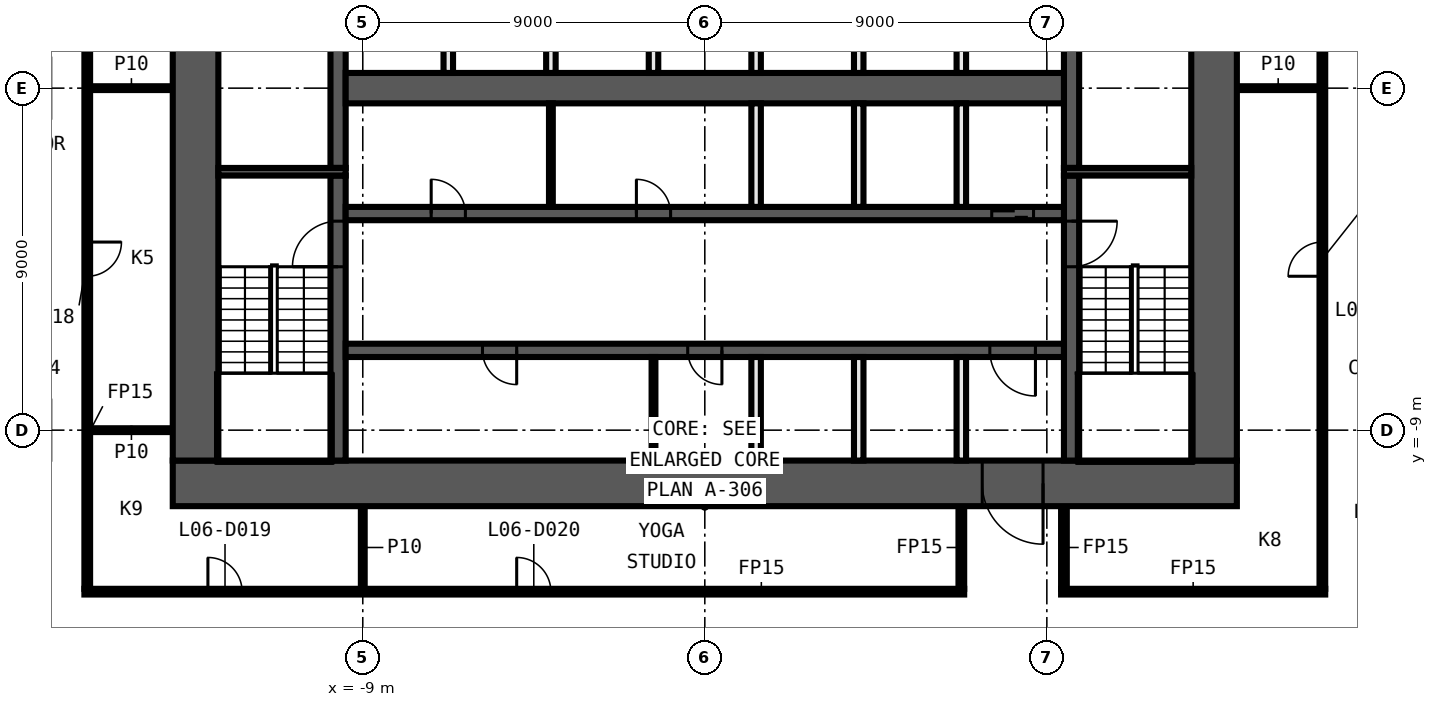
"""IFC4 building model, lengths in metres.
Left out: names, types, materials, properties, quantities, classifications, styles, units other than length and angle.
Written with IfcOpenShell. Run it as: python <this file> out.ifc"""

import sys

from ifc_helpers import new_model, si_unit, direction, frame, frame_2d, origin, place, context, subcontext, project, spatial, rectangle, extrude, element, fill, save


model = new_model("IFC4")
c1 = context("Model", 3, precision=1e-05, world=origin(), true_north=direction((0.0, 1.0)))
c2 = subcontext(c1, "Body", "Model", "MODEL_VIEW")
j1 = project(units=[si_unit("LENGTHUNIT", "METRE"), si_unit("PLANEANGLEUNIT", "RADIAN")], contexts=[c1])
p1 = place(None, origin())
s1 = spatial("IfcSite", under=j1, at=p1, CompositionType="ELEMENT")
p2 = place(p1, origin())
s2 = spatial("IfcBuilding", under=s1, at=p2, CompositionType="ELEMENT")
p3 = place(p2, frame((0.0, 0.0, 44.0)))
s3 = spatial("IfcBuildingStorey", under=s2, at=p3, CompositionType="ELEMENT", Elevation=44.0)
p4 = place(p3, frame((-16.325, -13.25, 0.0), z_axis=(0.0, 0.0, 1.0), x_axis=(1.0, 0.0, 0.0)))
e1 = element("IfcWall", 1, at=p4, inside=s3, PredefinedType="PARTITIONING", context=c2, shape_type="SweptSolid", body=[
    extrude(rectangle(XDim=23.15, YDim=0.15, at=frame_2d((11.575, 0.0))), origin(), (0.0, 0.0, 1.0), 3.3),
])
p5 = place(p4, frame((3.25, 0.0, 0.0)))
e2 = element("IfcOpeningElement", 2, at=p5, cuts=e1, PredefinedType="OPENING", context=c2, shape_type="SweptSolid", body=[
    extrude(rectangle(XDim=0.9, YDim=2.1, at=frame_2d((0.45, 1.05))), frame((0.0, 0.085, 0.0), z_axis=(0.0, -1.0, 0.0), x_axis=(1.0, 0.0, 0.0)), (0.0, 0.0, 1.0), 0.17),
])
p6 = place(p4, frame((11.375, 0.0, 0.0)))
e3 = element("IfcOpeningElement", 3, at=p6, cuts=e1, PredefinedType="OPENING", context=c2, shape_type="SweptSolid", body=[
    extrude(rectangle(XDim=0.9, YDim=2.1, at=frame_2d((0.45, 1.05))), frame((0.0, 0.085, 0.0), z_axis=(0.0, -1.0, 0.0), x_axis=(1.0, 0.0, 0.0)), (0.0, 0.0, 1.0), 0.17),
])
p7 = place(p3, frame((9.375, -13.25, 0.0), z_axis=(0.0, 0.0, 1.0), x_axis=(1.0, 0.0, 0.0)))
e4 = element("IfcWall", 4, at=p7, inside=s3, PredefinedType="PARTITIONING", context=c2, shape_type="SweptSolid", body=[
    extrude(rectangle(XDim=6.95, YDim=0.15, at=frame_2d((3.475, 0.0))), origin(), (0.0, 0.0, 1.0), 3.3),
])
for number, where, z_axis, x_axis in (
    (5, (-16.175, -9.0, 0.0), (0.0, 0.0, 1.0), (1.0, 0.0, 0.0)),
    (6, (-16.175, 0.0, 0.0), (0.0, 0.0, 1.0), (1.0, 0.0, 0.0)),
    (7, (14.0, 0.0, 0.0), (0.0, 0.0, 1.0), (1.0, 0.0, 0.0)),
):
    element("IfcWall", number, at=place(p3, frame(where, z_axis=z_axis, x_axis=x_axis)), inside=s3, PredefinedType="PARTITIONING", context=c2, shape_type="SweptSolid", body=[
        extrude(rectangle(XDim=2.175, YDim=0.1, at=frame_2d((1.087, 0.0))), origin(), (0.0, 0.0, 1.0), 3.3),
    ])
p8 = place(p3, frame((16.25, -13.175, 0.0), z_axis=(0.0, 0.0, 1.0), x_axis=(0.0, 1.0, 0.0)))
e8 = element("IfcWall", 8, at=p8, inside=s3, PredefinedType="PARTITIONING", context=c2, shape_type="SweptSolid", body=[
    extrude(rectangle(XDim=26.35, YDim=0.15, at=frame_2d((13.175, 0.0))), origin(), (0.0, 0.0, 1.0), 3.3),
])
p9 = place(p8, frame((8.225, 0.0, 0.0)))
e9 = element("IfcOpeningElement", 9, at=p9, cuts=e8, PredefinedType="OPENING", context=c2, shape_type="SweptSolid", body=[
    extrude(rectangle(XDim=0.9, YDim=2.1, at=frame_2d((0.45, 1.05))), frame((0.0, 0.085, 0.0), z_axis=(0.0, -1.0, 0.0), x_axis=(1.0, 0.0, 0.0)), (0.0, 0.0, 1.0), 0.17),
])
p10 = place(p8, frame((17.225, 0.0, 0.0)))
e10 = element("IfcOpeningElement", 10, at=p10, cuts=e8, PredefinedType="OPENING", context=c2, shape_type="SweptSolid", body=[
    extrude(rectangle(XDim=0.9, YDim=2.1, at=frame_2d((0.45, 1.05))), frame((0.0, 0.085, 0.0), z_axis=(0.0, -1.0, 0.0), x_axis=(1.0, 0.0, 0.0)), (0.0, 0.0, 1.0), 0.17),
])
for number, where, z_axis, x_axis in (
    (11, (9.45, -13.175, 0.0), (0.0, 0.0, 1.0), (0.0, 1.0, 0.0)),
    (12, (6.75, -13.175, 0.0), (0.0, 0.0, 1.0), (0.0, 1.0, 0.0)),
):
    element("IfcWall", number, at=place(p3, frame(where, z_axis=z_axis, x_axis=x_axis)), inside=s3, PredefinedType="PARTITIONING", context=c2, shape_type="SweptSolid", body=[
        extrude(rectangle(XDim=2.175, YDim=0.15, at=frame_2d((1.087, 0.0))), origin(), (0.0, 0.0, 1.0), 3.3),
    ])
p11 = place(p3, frame((-9.0, -13.175, 0.0), z_axis=(0.0, 0.0, 1.0), x_axis=(0.0, 1.0, 0.0)))
e13 = element("IfcWall", 13, at=p11, inside=s3, PredefinedType="PARTITIONING", context=c2, shape_type="SweptSolid", body=[
    extrude(rectangle(XDim=2.175, YDim=0.1, at=frame_2d((1.087, 0.0))), origin(), (0.0, 0.0, 1.0), 3.3),
])
p12 = place(p3, frame((-16.25, 13.175, 0.0), z_axis=(0.0, 0.0, 1.0), x_axis=(0.0, -1.0, 0.0)))
e14 = element("IfcWall", 14, at=p12, inside=s3, PredefinedType="PARTITIONING", context=c2, shape_type="SweptSolid", body=[
    extrude(rectangle(XDim=26.35, YDim=0.15, at=frame_2d((13.175, 0.0))), origin(), (0.0, 0.0, 1.0), 3.3),
])
p13 = place(p12, frame((17.225, 0.0, 0.0)))
e15 = element("IfcOpeningElement", 15, at=p13, cuts=e14, PredefinedType="OPENING", context=c2, shape_type="SweptSolid", body=[
    extrude(rectangle(XDim=0.9, YDim=2.1, at=frame_2d((0.45, 1.05))), frame((0.0, 0.085, 0.0), z_axis=(0.0, -1.0, 0.0), x_axis=(1.0, 0.0, 0.0)), (0.0, 0.0, 1.0), 0.17),
])
p14 = place(p12, frame((8.225, 0.0, 0.0)))
e16 = element("IfcOpeningElement", 16, at=p14, cuts=e14, PredefinedType="OPENING", context=c2, shape_type="SweptSolid", body=[
    extrude(rectangle(XDim=0.9, YDim=2.1, at=frame_2d((0.45, 1.05))), frame((0.0, 0.085, 0.0), z_axis=(0.0, -1.0, 0.0), x_axis=(1.0, 0.0, 0.0)), (0.0, 0.0, 1.0), 0.17),
])
p15 = place(p3, frame((14.0, -10.4, 0.0), z_axis=(0.0, 0.0, 1.0), x_axis=(-1.0, 0.0, 0.0)))
e17 = element("IfcWall", 17, at=p15, inside=s3, PredefinedType="SHEAR", context=c2, shape_type="SweptSolid", body=[
    extrude(rectangle(XDim=28.0, YDim=1.2, at=frame_2d((14.0, 0.0))), origin(), (0.0, 0.0, 1.0), 3.3),
])
p16 = place(p15, frame((5.1, 0.0, 0.0)))
e18 = element("IfcOpeningElement", 18, at=p16, cuts=e17, PredefinedType="OPENING", context=c2, shape_type="SweptSolid", body=[
    extrude(rectangle(XDim=1.6, YDim=2.1, at=frame_2d((0.8, 1.05))), frame((0.0, 0.61, 0.0), z_axis=(0.0, -1.0, 0.0), x_axis=(1.0, 0.0, 0.0)), (0.0, 0.0, 1.0), 1.22),
])
for number, where, z_axis, x_axis in (
    (19, (13.4, 9.8, 0.0), (0.0, 0.0, 1.0), (0.0, -1.0, 0.0)),
    (20, (-13.4, -9.8, 0.0), (0.0, 0.0, 1.0), (0.0, 1.0, 0.0)),
):
    element("IfcWall", number, at=place(p3, frame(where, z_axis=z_axis, x_axis=x_axis)), inside=s3, PredefinedType="SHEAR", context=c2, shape_type="SweptSolid", body=[
        extrude(rectangle(XDim=19.6, YDim=1.2, at=frame_2d((9.8, 0.0))), origin(), (0.0, 0.0, 1.0), 3.3),
    ])
p17 = place(p3, frame((9.65, -2.3, 0.0), z_axis=(0.0, 0.0, 1.0), x_axis=(0.0, -1.0, 0.0)))
e21 = element("IfcWall", 21, at=p17, inside=s3, PredefinedType="SHEAR", context=c2, shape_type="SweptSolid", body=[
    extrude(rectangle(XDim=7.5, YDim=0.4, at=frame_2d((3.75, 0.0))), origin(), (0.0, 0.0, 1.0), 3.3),
])
p18 = place(p17, frame((1.2, 0.0, 0.0)))
e22 = element("IfcOpeningElement", 22, at=p18, cuts=e21, PredefinedType="OPENING", context=c2, shape_type="SweptSolid", body=[
    extrude(rectangle(XDim=1.2, YDim=2.1, at=frame_2d((0.6, 1.05))), frame((0.0, 0.21, 0.0), z_axis=(0.0, -1.0, 0.0), x_axis=(1.0, 0.0, 0.0)), (0.0, 0.0, 1.0), 0.42),
])
p19 = place(p3, frame((9.65, 2.1, 0.0), z_axis=(0.0, 0.0, 1.0), x_axis=(0.0, -1.0, 0.0)))
e23 = element("IfcWall", 23, at=p19, inside=s3, PredefinedType="SHEAR", context=c2, shape_type="SweptSolid", body=[
    extrude(rectangle(XDim=4.2, YDim=0.4, at=frame_2d((2.1, 0.0))), origin(), (0.0, 0.0, 1.0), 3.3),
])
p20 = place(p19, frame((0.15, 0.0, 0.0)))
e24 = element("IfcOpeningElement", 24, at=p20, cuts=e23, PredefinedType="OPENING", context=c2, shape_type="SweptSolid", body=[
    extrude(rectangle(XDim=0.9, YDim=2.1, at=frame_2d((0.45, 1.05))), frame((0.0, 0.21, 0.0), z_axis=(0.0, -1.0, 0.0), x_axis=(1.0, 0.0, 0.0)), (0.0, 0.0, 1.0), 0.42),
])
p21 = place(p3, frame((-9.65, -9.8, 0.0), z_axis=(0.0, 0.0, 1.0), x_axis=(0.0, 1.0, 0.0)))
e25 = element("IfcWall", 25, at=p21, inside=s3, PredefinedType="SHEAR", context=c2, shape_type="SweptSolid", body=[
    extrude(rectangle(XDim=7.5, YDim=0.4, at=frame_2d((3.75, 0.0))), origin(), (0.0, 0.0, 1.0), 3.3),
])
p22 = place(p21, frame((5.1, 0.0, 0.0)))
e26 = element("IfcOpeningElement", 26, at=p22, cuts=e25, PredefinedType="OPENING", context=c2, shape_type="SweptSolid", body=[
    extrude(rectangle(XDim=1.2, YDim=2.1, at=frame_2d((0.6, 1.05))), frame((0.0, 0.21, 0.0), z_axis=(0.0, -1.0, 0.0), x_axis=(1.0, 0.0, 0.0)), (0.0, 0.0, 1.0), 0.42),
])
p23 = place(p3, frame((-9.65, -2.1, 0.0), z_axis=(0.0, 0.0, 1.0), x_axis=(0.0, 1.0, 0.0)))
e27 = element("IfcWall", 27, at=p23, inside=s3, PredefinedType="SHEAR", context=c2, shape_type="SweptSolid", body=[
    extrude(rectangle(XDim=4.2, YDim=0.4, at=frame_2d((2.1, 0.0))), origin(), (0.0, 0.0, 1.0), 3.3),
])
for number, where, z_axis, x_axis in (
    (28, (9.45, -2.2, 0.0), (0.0, 0.0, 1.0), (1.0, 0.0, 0.0)),
    (29, (-9.45, -2.2, 0.0), (0.0, 0.0, 1.0), (-1.0, 0.0, 0.0)),
):
    element("IfcWall", number, at=place(p3, frame(where, z_axis=z_axis, x_axis=x_axis)), inside=s3, PredefinedType="SHEAR", context=c2, shape_type="SweptSolid", body=[
        extrude(rectangle(XDim=3.35, YDim=0.2, at=frame_2d((1.675, 0.0))), origin(), (0.0, 0.0, 1.0), 3.3),
    ])
p24 = place(p3, frame((-9.45, -3.3, 0.0), z_axis=(0.0, 0.0, 1.0), x_axis=(1.0, 0.0, 0.0)))
e30 = element("IfcWall", 30, at=p24, inside=s3, PredefinedType="SHEAR", context=c2, shape_type="SweptSolid", body=[
    extrude(rectangle(XDim=18.9, YDim=0.35, at=frame_2d((9.45, 0.0))), origin(), (0.0, 0.0, 1.0), 3.3),
])
p25 = place(p24, frame((17.0, 0.0, 0.0)))
e31 = element("IfcOpeningElement", 31, at=p25, cuts=e30, PredefinedType="OPENING", context=c2, shape_type="SweptSolid", body=[
    extrude(rectangle(XDim=1.1, YDim=2.1, at=frame_2d((0.55, 1.05))), frame((0.0, 0.185, 0.0), z_axis=(0.0, -1.0, 0.0), x_axis=(1.0, 0.0, 0.0)), (0.0, 0.0, 1.0), 0.37),
])
p26 = place(p24, frame((2.25, 0.0, 0.0)))
e32 = element("IfcOpeningElement", 32, at=p26, cuts=e30, PredefinedType="OPENING", context=c2, shape_type="SweptSolid", body=[
    extrude(rectangle(XDim=0.9, YDim=2.1, at=frame_2d((0.45, 1.05))), frame((0.0, 0.185, 0.0), z_axis=(0.0, -1.0, 0.0), x_axis=(1.0, 0.0, 0.0)), (0.0, 0.0, 1.0), 0.37),
])
p27 = place(p24, frame((7.65, 0.0, 0.0)))
e33 = element("IfcOpeningElement", 33, at=p27, cuts=e30, PredefinedType="OPENING", context=c2, shape_type="SweptSolid", body=[
    extrude(rectangle(XDim=0.9, YDim=2.1, at=frame_2d((0.45, 1.05))), frame((0.0, 0.185, 0.0), z_axis=(0.0, -1.0, 0.0), x_axis=(1.0, 0.0, 0.0)), (0.0, 0.0, 1.0), 0.37),
])
p28 = place(p3, frame((9.45, -6.9, 0.0), z_axis=(0.0, 0.0, 1.0), x_axis=(-1.0, 0.0, 0.0)))
e34 = element("IfcWall", 34, at=p28, inside=s3, PredefinedType="SHEAR", context=c2, shape_type="SweptSolid", body=[
    extrude(rectangle(XDim=18.9, YDim=0.35, at=frame_2d((9.45, 0.0))), origin(), (0.0, 0.0, 1.0), 3.3),
])
p29 = place(p28, frame((0.75, 0.0, 0.0)))
e35 = element("IfcOpeningElement", 35, at=p29, cuts=e34, PredefinedType="OPENING", context=c2, shape_type="SweptSolid", body=[
    extrude(rectangle(XDim=1.2, YDim=2.1, at=frame_2d((0.6, 1.05))), frame((0.0, 0.185, 0.0), z_axis=(0.0, -1.0, 0.0), x_axis=(1.0, 0.0, 0.0)), (0.0, 0.0, 1.0), 0.37),
])
p30 = place(p28, frame((14.4, 0.0, 0.0)))
e36 = element("IfcOpeningElement", 36, at=p30, cuts=e34, PredefinedType="OPENING", context=c2, shape_type="SweptSolid", body=[
    extrude(rectangle(XDim=0.9, YDim=2.1, at=frame_2d((0.45, 1.05))), frame((0.0, 0.185, 0.0), z_axis=(0.0, -1.0, 0.0), x_axis=(1.0, 0.0, 0.0)), (0.0, 0.0, 1.0), 0.37),
])
p31 = place(p28, frame((9.0, 0.0, 0.0)))
e37 = element("IfcOpeningElement", 37, at=p31, cuts=e34, PredefinedType="OPENING", context=c2, shape_type="SweptSolid", body=[
    extrude(rectangle(XDim=0.9, YDim=2.1, at=frame_2d((0.45, 1.05))), frame((0.0, 0.185, 0.0), z_axis=(0.0, -1.0, 0.0), x_axis=(1.0, 0.0, 0.0)), (0.0, 0.0, 1.0), 0.37),
])
p32 = place(p3, frame((-9.45, 0.0, 0.0), z_axis=(0.0, 0.0, 1.0), x_axis=(1.0, 0.0, 0.0)))
e38 = element("IfcWall", 38, at=p32, inside=s3, PredefinedType="SHEAR", context=c2, shape_type="SweptSolid", body=[
    extrude(rectangle(XDim=18.9, YDim=0.8, at=frame_2d((9.45, 0.0))), origin(), (0.0, 0.0, 1.0), 3.3),
])
for number, where, z_axis, x_axis in (
    (39, (6.75, -9.8, 0.0), (0.0, 0.0, 1.0), (0.0, 1.0, 0.0)),
    (40, (6.75, -3.125, 0.0), (0.0, 0.0, 1.0), (0.0, 1.0, 0.0)),
    (41, (6.75, 0.4, 0.0), (0.0, 0.0, 1.0), (0.0, 1.0, 0.0)),
    (42, (4.05, -9.8, 0.0), (0.0, 0.0, 1.0), (0.0, 1.0, 0.0)),
    (43, (4.05, -3.125, 0.0), (0.0, 0.0, 1.0), (0.0, 1.0, 0.0)),
    (44, (4.05, 0.4, 0.0), (0.0, 0.0, 1.0), (0.0, 1.0, 0.0)),
    (45, (1.35, -9.8, 0.0), (0.0, 0.0, 1.0), (0.0, 1.0, 0.0)),
    (46, (1.35, -3.125, 0.0), (0.0, 0.0, 1.0), (0.0, 1.0, 0.0)),
    (47, (1.35, 0.4, 0.0), (0.0, 0.0, 1.0), (0.0, 1.0, 0.0)),
):
    element("IfcWall", number, at=place(p3, frame(where, z_axis=z_axis, x_axis=x_axis)), inside=s3, PredefinedType="SOLIDWALL", context=c2, shape_type="SweptSolid", body=[
        extrude(rectangle(XDim=2.725, YDim=0.25, at=frame_2d((1.363, 0.0))), origin(), (0.0, 0.0, 1.0), 3.3),
    ])
p33 = place(p3, frame((-1.35, -9.8, 0.0), z_axis=(0.0, 0.0, 1.0), x_axis=(0.0, 1.0, 0.0)))
e48 = element("IfcWall", 48, at=p33, inside=s3, PredefinedType="PARTITIONING", context=c2, shape_type="SweptSolid", body=[
    extrude(rectangle(XDim=2.725, YDim=0.1, at=frame_2d((1.363, 0.0))), origin(), (0.0, 0.0, 1.0), 3.3),
])
p34 = place(p3, frame((-1.35, 0.4, 0.0), z_axis=(0.0, 0.0, 1.0), x_axis=(0.0, 1.0, 0.0)))
e49 = element("IfcWall", 49, at=p34, inside=s3, PredefinedType="SOLIDWALL", context=c2, shape_type="SweptSolid", body=[
    extrude(rectangle(XDim=2.725, YDim=0.25, at=frame_2d((1.363, 0.0))), origin(), (0.0, 0.0, 1.0), 3.3),
])
p35 = place(p3, frame((-4.05, -3.125, 0.0), z_axis=(0.0, 0.0, 1.0), x_axis=(0.0, 1.0, 0.0)))
e50 = element("IfcWall", 50, at=p35, inside=s3, PredefinedType="PARTITIONING", context=c2, shape_type="SweptSolid", body=[
    extrude(rectangle(XDim=2.725, YDim=0.1, at=frame_2d((1.363, 0.0))), origin(), (0.0, 0.0, 1.0), 3.3),
])
for number, where, z_axis, x_axis in (
    (51, (-4.05, 0.4, 0.0), (0.0, 0.0, 1.0), (0.0, 1.0, 0.0)),
    (52, (-6.75, 0.4, 0.0), (0.0, 0.0, 1.0), (0.0, 1.0, 0.0)),
):
    element("IfcWall", number, at=place(p3, frame(where, z_axis=z_axis, x_axis=x_axis)), inside=s3, PredefinedType="SOLIDWALL", context=c2, shape_type="SweptSolid", body=[
        extrude(rectangle(XDim=2.725, YDim=0.25, at=frame_2d((1.363, 0.0))), origin(), (0.0, 0.0, 1.0), 3.3),
    ])
p36 = place(p13, origin())
e53 = element("IfcDoor", 53, at=p36, inside=s3, OperationType="SINGLE_SWING_RIGHT", PredefinedType="DOOR", context=c2, shape_type="SweptSolid", body=[
    extrude(rectangle(XDim=0.9, YDim=2.1, at=frame_2d((0.45, 1.05))), frame((0.0, 0.025, 0.0), z_axis=(0.0, -1.0, 0.0), x_axis=(1.0, 0.0, 0.0)), (0.0, 0.0, 1.0), 0.05),
])
fill(e15, e53)
p37 = place(p5, origin())
e54 = element("IfcDoor", 54, at=p37, inside=s3, OperationType="SINGLE_SWING_LEFT", PredefinedType="DOOR", context=c2, shape_type="SweptSolid", body=[
    extrude(rectangle(XDim=0.9, YDim=2.1, at=frame_2d((0.45, 1.05))), frame((0.0, 0.025, 0.0), z_axis=(0.0, -1.0, 0.0), x_axis=(1.0, 0.0, 0.0)), (0.0, 0.0, 1.0), 0.05),
])
fill(e2, e54)
p38 = place(p6, origin())
e55 = element("IfcDoor", 55, at=p38, inside=s3, OperationType="SINGLE_SWING_RIGHT", PredefinedType="DOOR", context=c2, shape_type="SweptSolid", body=[
    extrude(rectangle(XDim=0.9, YDim=2.1, at=frame_2d((0.45, 1.05))), frame((0.0, 0.025, 0.0), z_axis=(0.0, -1.0, 0.0), x_axis=(1.0, 0.0, 0.0)), (0.0, 0.0, 1.0), 0.05),
])
fill(e3, e55)
p39 = place(p9, origin())
e56 = element("IfcDoor", 56, at=p39, inside=s3, OperationType="SINGLE_SWING_LEFT", PredefinedType="DOOR", context=c2, shape_type="SweptSolid", body=[
    extrude(rectangle(XDim=0.9, YDim=2.1, at=frame_2d((0.45, 1.05))), frame((0.0, 0.025, 0.0), z_axis=(0.0, -1.0, 0.0), x_axis=(1.0, 0.0, 0.0)), (0.0, 0.0, 1.0), 0.05),
])
fill(e9, e56)
p40 = place(p25, origin())
e57 = element("IfcDoor", 57, at=p40, inside=s3, OperationType="DOUBLE_DOOR_SLIDING", PredefinedType="DOOR", context=c2, shape_type="SweptSolid", body=[
    extrude(rectangle(XDim=1.1, YDim=2.1, at=frame_2d((0.55, 1.05))), frame((0.0, 0.025, 0.0), z_axis=(0.0, -1.0, 0.0), x_axis=(1.0, 0.0, 0.0)), (0.0, 0.0, 1.0), 0.05),
])
fill(e31, e57)
p41 = place(p16, origin())
e58 = element("IfcDoor", 58, at=p41, inside=s3, OperationType="DOUBLE_DOOR_SINGLE_SWING", PredefinedType="DOOR", context=c2, shape_type="SweptSolid", body=[
    extrude(rectangle(XDim=1.6, YDim=2.1, at=frame_2d((0.8, 1.05))), frame((0.0, 0.025, 0.0), z_axis=(0.0, -1.0, 0.0), x_axis=(1.0, 0.0, 0.0)), (0.0, 0.0, 1.0), 0.05),
])
fill(e18, e58)
p42 = place(p29, origin())
e59 = element("IfcDoor", 59, at=p42, inside=s3, OperationType="SINGLE_SWING_LEFT", PredefinedType="DOOR", context=c2, shape_type="SweptSolid", body=[
    extrude(rectangle(XDim=1.2, YDim=2.1, at=frame_2d((0.6, 1.05))), frame((0.0, 0.025, 0.0), z_axis=(0.0, -1.0, 0.0), x_axis=(1.0, 0.0, 0.0)), (0.0, 0.0, 1.0), 0.05),
])
fill(e35, e59)
p43 = place(p26, origin())
e60 = element("IfcDoor", 60, at=p43, inside=s3, OperationType="SINGLE_SWING_RIGHT", PredefinedType="DOOR", context=c2, shape_type="SweptSolid", body=[
    extrude(rectangle(XDim=0.9, YDim=2.1, at=frame_2d((0.45, 1.05))), frame((0.0, 0.025, 0.0), z_axis=(0.0, -1.0, 0.0), x_axis=(1.0, 0.0, 0.0)), (0.0, 0.0, 1.0), 0.05),
])
fill(e32, e60)
p44 = place(p27, origin())
e61 = element("IfcDoor", 61, at=p44, inside=s3, OperationType="SINGLE_SWING_LEFT", PredefinedType="DOOR", context=c2, shape_type="SweptSolid", body=[
    extrude(rectangle(XDim=0.9, YDim=2.1, at=frame_2d((0.45, 1.05))), frame((0.0, 0.025, 0.0), z_axis=(0.0, -1.0, 0.0), x_axis=(1.0, 0.0, 0.0)), (0.0, 0.0, 1.0), 0.05),
])
fill(e33, e61)
p45 = place(p30, origin())
e62 = element("IfcDoor", 62, at=p45, inside=s3, OperationType="SINGLE_SWING_RIGHT", PredefinedType="DOOR", context=c2, shape_type="SweptSolid", body=[
    extrude(rectangle(XDim=0.9, YDim=2.1, at=frame_2d((0.45, 1.05))), frame((0.0, 0.025, 0.0), z_axis=(0.0, -1.0, 0.0), x_axis=(1.0, 0.0, 0.0)), (0.0, 0.0, 1.0), 0.05),
])
fill(e36, e62)
p46 = place(p31, origin())
e63 = element("IfcDoor", 63, at=p46, inside=s3, OperationType="SINGLE_SWING_LEFT", PredefinedType="DOOR", context=c2, shape_type="SweptSolid", body=[
    extrude(rectangle(XDim=0.9, YDim=2.1, at=frame_2d((0.45, 1.05))), frame((0.0, 0.025, 0.0), z_axis=(0.0, -1.0, 0.0), x_axis=(1.0, 0.0, 0.0)), (0.0, 0.0, 1.0), 0.05),
])
fill(e37, e63)
p47 = place(p18, origin())
e64 = element("IfcDoor", 64, at=p47, inside=s3, OperationType="SINGLE_SWING_RIGHT", PredefinedType="DOOR", context=c2, shape_type="SweptSolid", body=[
    extrude(rectangle(XDim=1.2, YDim=2.1, at=frame_2d((0.6, 1.05))), frame((0.0, 0.025, 0.0), z_axis=(0.0, -1.0, 0.0), x_axis=(1.0, 0.0, 0.0)), (0.0, 0.0, 1.0), 0.05),
])
fill(e22, e64)
p48 = place(p22, origin())
e65 = element("IfcDoor", 65, at=p48, inside=s3, OperationType="SINGLE_SWING_LEFT", PredefinedType="DOOR", context=c2, shape_type="SweptSolid", body=[
    extrude(rectangle(XDim=1.2, YDim=2.1, at=frame_2d((0.6, 1.05))), frame((0.0, 0.025, 0.0), z_axis=(0.0, -1.0, 0.0), x_axis=(1.0, 0.0, 0.0)), (0.0, 0.0, 1.0), 0.05),
])
fill(e26, e65)
save(model, sys.argv[1])
